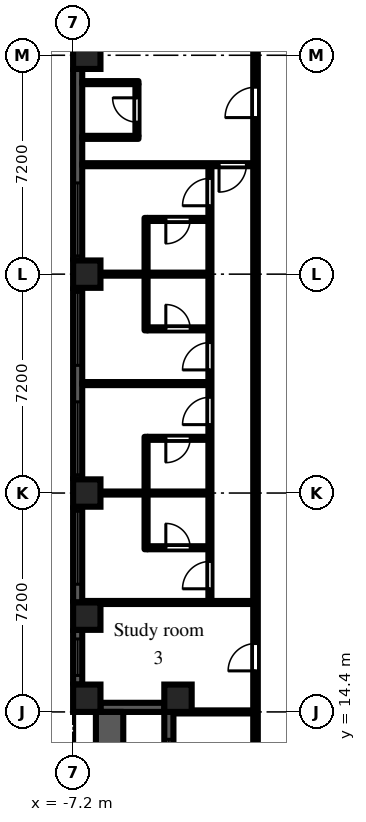
"""IFC4 building model, lengths in metres.
Left out: names, types, materials, properties, quantities, classifications, styles, units other than length and angle.
Written with IfcOpenShell. Run it as: python <this file> out.ifc"""

import sys

from ifc_helpers import new_model, si_unit, direction, frame, frame_2d, origin, origin_2d, place, context, subcontext, project, spatial, rectangle, extrude, element, fill, save


model = new_model("IFC4")
c1 = context("Model", 3, precision=1e-05, world=origin(), true_north=direction((0.0, 1.0)))
c2 = subcontext(c1, "Body", "Model", "MODEL_VIEW")
j1 = project(units=[si_unit("LENGTHUNIT", "METRE"), si_unit("PLANEANGLEUNIT", "RADIAN")], contexts=[c1])
p1 = place(None, origin())
s1 = spatial("IfcSite", under=j1, at=p1, CompositionType="ELEMENT")
p2 = place(p1, origin())
s2 = spatial("IfcBuilding", under=s1, at=p2, CompositionType="ELEMENT")
p3 = place(p2, frame((0.0, 0.0, 29.7)))
s3 = spatial("IfcBuildingStorey", under=s2, at=p3, CompositionType="ELEMENT", Elevation=29.7)
for number, where, z_axis, x_axis in (
    (1, (-6.75, 14.85, 0.0), (0.0, 0.0, 1.0), (1.0, 0.0, 0.0)),
    (2, (-6.75, 17.55, 0.0), (0.0, 0.0, 1.0), (1.0, 0.0, 0.0)),
    (3, (-6.75, 21.6, 0.0), (0.0, 0.0, 1.0), (1.0, 0.0, 0.0)),
    (4, (-6.75, 28.8, 0.0), (0.0, 0.0, 1.0), (1.0, 0.0, 0.0)),
    (5, (-6.75, 36.0, 0.0), (0.0, 0.0, 1.0), (1.0, 0.0, 0.0)),
    (6, (-3.75, 14.85, 0.0), (0.0, 0.0, 1.0), (1.0, 0.0, 0.0)),
):
    element("IfcColumn", number, at=place(p3, frame(where, z_axis=z_axis, x_axis=x_axis)), inside=s3, PredefinedType="COLUMN", context=c2, shape_type="SweptSolid", body=[
        extrude(rectangle(XDim=0.9, YDim=0.9, at=origin_2d()), origin(), (0.0, 0.0, 1.0), 3.0),
    ])
p4 = place(p3, frame((-7.05, 35.55, 0.0), z_axis=(0.0, 0.0, 1.0), x_axis=(0.0, -1.0, 0.0)))
e7 = element("IfcWall", 7, at=p4, inside=s3, PredefinedType="SOLIDWALL", context=c2, shape_type="SweptSolid", body=[
    extrude(rectangle(XDim=6.3, YDim=0.3, at=frame_2d((3.15, 0.0))), origin(), (0.0, 0.0, 1.0), 2.1),
])
p5 = place(p4, frame((3.75, 0.0, 0.2)))
e8 = element("IfcOpeningElement", 8, at=p5, cuts=e7, PredefinedType="OPENING", context=c2, shape_type="SweptSolid", body=[
    extrude(rectangle(XDim=2.4, YDim=1.85, at=frame_2d((1.2, 0.925))), frame((0.0, 0.16, 0.0), z_axis=(0.0, -1.0, 0.0), x_axis=(1.0, 0.0, 0.0)), (0.0, 0.0, 1.0), 0.32),
])
p6 = place(p3, frame((-7.05, 28.35, 0.0), z_axis=(0.0, 0.0, 1.0), x_axis=(0.0, -1.0, 0.0)))
e9 = element("IfcWall", 9, at=p6, inside=s3, PredefinedType="SOLIDWALL", context=c2, shape_type="SweptSolid", body=[
    extrude(rectangle(XDim=6.3, YDim=0.3, at=frame_2d((3.15, 0.0))), origin(), (0.0, 0.0, 1.0), 2.1),
])
p7 = place(p6, frame((0.15, 0.0, 0.2)))
e10 = element("IfcOpeningElement", 10, at=p7, cuts=e9, PredefinedType="OPENING", context=c2, shape_type="SweptSolid", body=[
    extrude(rectangle(XDim=2.4, YDim=1.85, at=frame_2d((1.2, 0.925))), frame((0.0, 0.16, 0.0), z_axis=(0.0, -1.0, 0.0), x_axis=(1.0, 0.0, 0.0)), (0.0, 0.0, 1.0), 0.32),
])
p8 = place(p6, frame((3.75, 0.0, 0.2)))
e11 = element("IfcOpeningElement", 11, at=p8, cuts=e9, PredefinedType="OPENING", context=c2, shape_type="SweptSolid", body=[
    extrude(rectangle(XDim=2.4, YDim=1.85, at=frame_2d((1.2, 0.925))), frame((0.0, 0.16, 0.0), z_axis=(0.0, -1.0, 0.0), x_axis=(1.0, 0.0, 0.0)), (0.0, 0.0, 1.0), 0.32),
])
p9 = place(p3, frame((-7.05, 21.15, 0.0), z_axis=(0.0, 0.0, 1.0), x_axis=(0.0, -1.0, 0.0)))
e12 = element("IfcWall", 12, at=p9, inside=s3, PredefinedType="SOLIDWALL", context=c2, shape_type="SweptSolid", body=[
    extrude(rectangle(XDim=3.15, YDim=0.3, at=frame_2d((1.575, 0.0))), origin(), (0.0, 0.0, 1.0), 2.1),
])
p10 = place(p9, frame((0.15, 0.0, 0.2)))
e13 = element("IfcOpeningElement", 13, at=p10, cuts=e12, PredefinedType="OPENING", context=c2, shape_type="SweptSolid", body=[
    extrude(rectangle(XDim=2.4, YDim=1.85, at=frame_2d((1.2, 0.925))), frame((0.0, 0.16, 0.0), z_axis=(0.0, -1.0, 0.0), x_axis=(1.0, 0.0, 0.0)), (0.0, 0.0, 1.0), 0.32),
])
p11 = place(p3, frame((-7.05, 17.1, 0.0), z_axis=(0.0, 0.0, 1.0), x_axis=(0.0, -1.0, 0.0)))
e14 = element("IfcWall", 14, at=p11, inside=s3, PredefinedType="SOLIDWALL", context=c2, shape_type="SweptSolid", body=[
    extrude(rectangle(XDim=1.8, YDim=0.3, at=frame_2d((0.9, 0.0))), origin(), (0.0, 0.0, 1.0), 2.1),
])
p12 = place(p11, frame((0.3, 0.0, 0.2)))
e15 = element("IfcOpeningElement", 15, at=p12, cuts=e14, PredefinedType="OPENING", context=c2, shape_type="SweptSolid", body=[
    extrude(rectangle(XDim=1.2, YDim=1.85, at=frame_2d((0.6, 0.925))), frame((0.0, 0.16, 0.0), z_axis=(0.0, -1.0, 0.0), x_axis=(1.0, 0.0, 0.0)), (0.0, 0.0, 1.0), 0.32),
])
p13 = place(p3, frame((-6.3, 14.55, 0.0), z_axis=(0.0, 0.0, 1.0), x_axis=(1.0, 0.0, 0.0)))
e16 = element("IfcWall", 16, at=p13, inside=s3, PredefinedType="SOLIDWALL", context=c2, shape_type="SweptSolid", body=[
    extrude(rectangle(XDim=2.1, YDim=0.3, at=frame_2d((1.05, 0.0))), origin(), (0.0, 0.0, 1.0), 2.1),
])
p14 = place(p3, frame((-4.05, 14.4, 0.0), z_axis=(0.0, 0.0, 1.0), x_axis=(0.0, -1.0, 0.0)))
e17 = element("IfcWall", 17, at=p14, inside=s3, PredefinedType="SOLIDWALL", context=c2, shape_type="SweptSolid", body=[
    extrude(rectangle(XDim=7.2, YDim=0.3, at=frame_2d((3.6, 0.0))), origin(), (0.0, 0.0, 1.0), 2.1),
])
p15 = place(p14, frame((3.0, 0.0, 0.0)))
e18 = element("IfcOpeningElement", 18, at=p15, cuts=e17, PredefinedType="OPENING", context=c2, shape_type="SweptSolid", body=[
    extrude(rectangle(XDim=1.2, YDim=2.05, at=frame_2d((0.6, 1.025))), frame((0.0, 0.16, 0.0), z_axis=(0.0, -1.0, 0.0), x_axis=(1.0, 0.0, 0.0)), (0.0, 0.0, 1.0), 0.32),
])
p16 = place(p14, frame((0.9, 0.0, 0.2)))
e19 = element("IfcOpeningElement", 19, at=p16, cuts=e17, PredefinedType="OPENING", context=c2, shape_type="SweptSolid", body=[
    extrude(rectangle(XDim=1.8, YDim=1.85, at=frame_2d((0.9, 0.925))), frame((0.0, 0.16, 0.0), z_axis=(0.0, -1.0, 0.0), x_axis=(1.0, 0.0, 0.0)), (0.0, 0.0, 1.0), 0.32),
])
p17 = place(p14, frame((4.5, 0.0, 0.2)))
e20 = element("IfcOpeningElement", 20, at=p17, cuts=e17, PredefinedType="OPENING", context=c2, shape_type="SweptSolid", body=[
    extrude(rectangle(XDim=1.8, YDim=1.85, at=frame_2d((0.9, 0.925))), frame((0.0, 0.16, 0.0), z_axis=(0.0, -1.0, 0.0), x_axis=(1.0, 0.0, 0.0)), (0.0, 0.0, 1.0), 0.32),
])
p18 = place(p3, frame((-6.0, 7.2, 0.0), z_axis=(0.0, 0.0, 1.0), x_axis=(0.0, 1.0, 0.0)))
e21 = element("IfcWall", 21, at=p18, inside=s3, PredefinedType="PARAPET", context=c2, shape_type="SweptSolid", body=[
    extrude(rectangle(XDim=7.2, YDim=0.9, at=frame_2d((3.6, 0.0))), origin(), (0.0, 0.0, 1.0), 0.8),
])
p19 = place(p3, frame((-6.9, 18.0, 0.0), z_axis=(0.0, 0.0, 1.0), x_axis=(1.0, 0.0, 0.0)))
e22 = element("IfcWall", 22, at=p19, inside=s3, PredefinedType="PARTITIONING", context=c2, shape_type="SweptSolid", body=[
    extrude(rectangle(XDim=5.625, YDim=0.1, at=frame_2d((2.812, 0.0))), origin(), (0.0, 0.0, 1.0), 2.575),
])
for number, where, z_axis, x_axis in (
    (23, (-6.9, 21.6, 0.0), (0.0, 0.0, 1.0), (1.0, 0.0, 0.0)),
    (24, (-6.9, 25.2, 0.0), (0.0, 0.0, 1.0), (1.0, 0.0, 0.0)),
    (25, (-6.9, 28.8, 0.0), (0.0, 0.0, 1.0), (1.0, 0.0, 0.0)),
):
    element("IfcWall", number, at=place(p3, frame(where, z_axis=z_axis, x_axis=x_axis)), inside=s3, PredefinedType="PARTITIONING", context=c2, shape_type="SweptSolid", body=[
        extrude(rectangle(XDim=4.15, YDim=0.1, at=frame_2d((2.075, 0.0))), origin(), (0.0, 0.0, 1.0), 2.575),
    ])
p20 = place(p3, frame((-6.9, 32.4, 0.0), z_axis=(0.0, 0.0, 1.0), x_axis=(1.0, 0.0, 0.0)))
e26 = element("IfcWall", 26, at=p20, inside=s3, PredefinedType="PARTITIONING", context=c2, shape_type="SweptSolid", body=[
    extrude(rectangle(XDim=5.625, YDim=0.1, at=frame_2d((2.812, 0.0))), origin(), (0.0, 0.0, 1.0), 2.575),
])
p21 = place(p20, frame((4.5, 0.0, 0.0)))
e27 = element("IfcOpeningElement", 27, at=p21, cuts=e26, PredefinedType="OPENING", context=c2, shape_type="SweptSolid", body=[
    extrude(rectangle(XDim=0.9, YDim=2.1, at=frame_2d((0.45, 1.05))), frame((0.0, 0.06, 0.0), z_axis=(0.0, -1.0, 0.0), x_axis=(1.0, 0.0, 0.0)), (0.0, 0.0, 1.0), 0.12),
])
for number, where, z_axis, x_axis in (
    (28, (-6.9, 33.3, 0.0), (0.0, 0.0, 1.0), (1.0, 0.0, 0.0)),
    (29, (-6.9, 35.1, 0.0), (0.0, 0.0, 1.0), (1.0, 0.0, 0.0)),
):
    element("IfcWall", number, at=place(p3, frame(where, z_axis=z_axis, x_axis=x_axis)), inside=s3, PredefinedType="PARTITIONING", context=c2, shape_type="SweptSolid", body=[
        extrude(rectangle(XDim=1.85, YDim=0.1, at=frame_2d((0.925, 0.0))), origin(), (0.0, 0.0, 1.0), 2.575),
    ])
p22 = place(p3, frame((-5.1, 33.35, 0.0), z_axis=(0.0, 0.0, 1.0), x_axis=(0.0, 1.0, 0.0)))
e30 = element("IfcWall", 30, at=p22, inside=s3, PredefinedType="PARTITIONING", context=c2, shape_type="SweptSolid", body=[
    extrude(rectangle(XDim=1.7, YDim=0.1, at=frame_2d((0.85, 0.0))), origin(), (0.0, 0.0, 1.0), 2.575),
])
p23 = place(p22, frame((0.45, 0.0, 0.0)))
e31 = element("IfcOpeningElement", 31, at=p23, cuts=e30, PredefinedType="OPENING", context=c2, shape_type="SweptSolid", body=[
    extrude(rectangle(XDim=0.8, YDim=2.1, at=frame_2d((0.4, 1.05))), frame((0.0, 0.06, 0.0), z_axis=(0.0, -1.0, 0.0), x_axis=(1.0, 0.0, 0.0)), (0.0, 0.0, 1.0), 0.12),
])
p24 = place(p3, frame((-4.8, 19.75, 0.0), z_axis=(0.0, 0.0, 1.0), x_axis=(0.0, 1.0, 0.0)))
e32 = element("IfcWall", 32, at=p24, inside=s3, PredefinedType="PARTITIONING", context=c2, shape_type="SweptSolid", body=[
    extrude(rectangle(XDim=3.7, YDim=0.1, at=frame_2d((1.85, 0.0))), origin(), (0.0, 0.0, 1.0), 2.575),
])
p25 = place(p3, frame((-4.75, 19.8, 0.0), z_axis=(0.0, 0.0, 1.0), x_axis=(1.0, 0.0, 0.0)))
e33 = element("IfcWall", 33, at=p25, inside=s3, PredefinedType="PARTITIONING", context=c2, shape_type="SweptSolid", body=[
    extrude(rectangle(XDim=2.0, YDim=0.1, at=frame_2d((1.0, 0.0))), origin(), (0.0, 0.0, 1.0), 2.575),
])
p26 = place(p25, frame((0.6, 0.0, 0.0)))
e34 = element("IfcOpeningElement", 34, at=p26, cuts=e33, PredefinedType="OPENING", context=c2, shape_type="SweptSolid", body=[
    extrude(rectangle(XDim=0.8, YDim=2.1, at=frame_2d((0.4, 1.05))), frame((0.0, 0.06, 0.0), z_axis=(0.0, -1.0, 0.0), x_axis=(1.0, 0.0, 0.0)), (0.0, 0.0, 1.0), 0.12),
])
p27 = place(p3, frame((-4.75, 23.4, 0.0), z_axis=(0.0, 0.0, 1.0), x_axis=(1.0, 0.0, 0.0)))
e35 = element("IfcWall", 35, at=p27, inside=s3, PredefinedType="PARTITIONING", context=c2, shape_type="SweptSolid", body=[
    extrude(rectangle(XDim=2.0, YDim=0.1, at=frame_2d((1.0, 0.0))), origin(), (0.0, 0.0, 1.0), 2.575),
])
p28 = place(p27, frame((0.6, 0.0, 0.0)))
e36 = element("IfcOpeningElement", 36, at=p28, cuts=e35, PredefinedType="OPENING", context=c2, shape_type="SweptSolid", body=[
    extrude(rectangle(XDim=0.8, YDim=2.1, at=frame_2d((0.4, 1.05))), frame((0.0, 0.06, 0.0), z_axis=(0.0, -1.0, 0.0), x_axis=(1.0, 0.0, 0.0)), (0.0, 0.0, 1.0), 0.12),
])
p29 = place(p3, frame((-4.8, 26.95, 0.0), z_axis=(0.0, 0.0, 1.0), x_axis=(0.0, 1.0, 0.0)))
e37 = element("IfcWall", 37, at=p29, inside=s3, PredefinedType="PARTITIONING", context=c2, shape_type="SweptSolid", body=[
    extrude(rectangle(XDim=3.7, YDim=0.1, at=frame_2d((1.85, 0.0))), origin(), (0.0, 0.0, 1.0), 2.575),
])
p30 = place(p3, frame((-4.75, 27.0, 0.0), z_axis=(0.0, 0.0, 1.0), x_axis=(1.0, 0.0, 0.0)))
e38 = element("IfcWall", 38, at=p30, inside=s3, PredefinedType="PARTITIONING", context=c2, shape_type="SweptSolid", body=[
    extrude(rectangle(XDim=2.0, YDim=0.1, at=frame_2d((1.0, 0.0))), origin(), (0.0, 0.0, 1.0), 2.575),
])
p31 = place(p30, frame((0.6, 0.0, 0.0)))
e39 = element("IfcOpeningElement", 39, at=p31, cuts=e38, PredefinedType="OPENING", context=c2, shape_type="SweptSolid", body=[
    extrude(rectangle(XDim=0.8, YDim=2.1, at=frame_2d((0.4, 1.05))), frame((0.0, 0.06, 0.0), z_axis=(0.0, -1.0, 0.0), x_axis=(1.0, 0.0, 0.0)), (0.0, 0.0, 1.0), 0.12),
])
p32 = place(p3, frame((-4.75, 30.6, 0.0), z_axis=(0.0, 0.0, 1.0), x_axis=(1.0, 0.0, 0.0)))
e40 = element("IfcWall", 40, at=p32, inside=s3, PredefinedType="PARTITIONING", context=c2, shape_type="SweptSolid", body=[
    extrude(rectangle(XDim=2.0, YDim=0.1, at=frame_2d((1.0, 0.0))), origin(), (0.0, 0.0, 1.0), 2.575),
])
p33 = place(p32, frame((0.6, 0.0, 0.0)))
e41 = element("IfcOpeningElement", 41, at=p33, cuts=e40, PredefinedType="OPENING", context=c2, shape_type="SweptSolid", body=[
    extrude(rectangle(XDim=0.8, YDim=2.1, at=frame_2d((0.4, 1.05))), frame((0.0, 0.06, 0.0), z_axis=(0.0, -1.0, 0.0), x_axis=(1.0, 0.0, 0.0)), (0.0, 0.0, 1.0), 0.12),
])
p34 = place(p3, frame((-3.9, 14.4, 0.0), z_axis=(0.0, 0.0, 1.0), x_axis=(1.0, 0.0, 0.0)))
e42 = element("IfcWall", 42, at=p34, inside=s3, PredefinedType="PARTITIONING", context=c2, shape_type="SweptSolid", body=[
    extrude(rectangle(XDim=2.625, YDim=0.1, at=frame_2d((1.312, 0.0))), origin(), (0.0, 0.0, 1.0), 2.575),
])
p35 = place(p3, frame((-2.7, 18.05, 0.0), z_axis=(0.0, 0.0, 1.0), x_axis=(0.0, 1.0, 0.0)))
e43 = element("IfcWall", 43, at=p35, inside=s3, PredefinedType="PARTITIONING", context=c2, shape_type="SweptSolid", body=[
    extrude(rectangle(XDim=14.3, YDim=0.1, at=frame_2d((7.15, 0.0))), origin(), (0.0, 0.0, 1.0), 2.575),
])
p36 = place(p35, frame((0.4, 0.0, 0.0)))
e44 = element("IfcOpeningElement", 44, at=p36, cuts=e43, PredefinedType="OPENING", context=c2, shape_type="SweptSolid", body=[
    extrude(rectangle(XDim=0.9, YDim=2.1, at=frame_2d((0.45, 1.05))), frame((0.0, 0.06, 0.0), z_axis=(0.0, -1.0, 0.0), x_axis=(1.0, 0.0, 0.0)), (0.0, 0.0, 1.0), 0.12),
])
p37 = place(p35, frame((5.8, 0.0, 0.0)))
e45 = element("IfcOpeningElement", 45, at=p37, cuts=e43, PredefinedType="OPENING", context=c2, shape_type="SweptSolid", body=[
    extrude(rectangle(XDim=0.9, YDim=2.1, at=frame_2d((0.45, 1.05))), frame((0.0, 0.06, 0.0), z_axis=(0.0, -1.0, 0.0), x_axis=(1.0, 0.0, 0.0)), (0.0, 0.0, 1.0), 0.12),
])
p38 = place(p35, frame((7.6, 0.0, 0.0)))
e46 = element("IfcOpeningElement", 46, at=p38, cuts=e43, PredefinedType="OPENING", context=c2, shape_type="SweptSolid", body=[
    extrude(rectangle(XDim=0.9, YDim=2.1, at=frame_2d((0.45, 1.05))), frame((0.0, 0.06, 0.0), z_axis=(0.0, -1.0, 0.0), x_axis=(1.0, 0.0, 0.0)), (0.0, 0.0, 1.0), 0.12),
])
p39 = place(p35, frame((13.0, 0.0, 0.0)))
e47 = element("IfcOpeningElement", 47, at=p39, cuts=e43, PredefinedType="OPENING", context=c2, shape_type="SweptSolid", body=[
    extrude(rectangle(XDim=0.9, YDim=2.1, at=frame_2d((0.45, 1.05))), frame((0.0, 0.06, 0.0), z_axis=(0.0, -1.0, 0.0), x_axis=(1.0, 0.0, 0.0)), (0.0, 0.0, 1.0), 0.12),
])
p40 = place(p3, frame((-1.2, 1.125, 0.0), z_axis=(0.0, 0.0, 1.0), x_axis=(0.0, 1.0, 0.0)))
e48 = element("IfcWall", 48, at=p40, inside=s3, PredefinedType="PARTITIONING", context=c2, shape_type="SweptSolid", body=[
    extrude(rectangle(XDim=35.375, YDim=0.15, at=frame_2d((17.688, 0.0))), origin(), (0.0, 0.0, 1.0), 2.575),
])
p41 = place(p40, frame((2.625, 0.0, 0.0)))
e49 = element("IfcOpeningElement", 49, at=p41, cuts=e48, PredefinedType="OPENING", context=c2, shape_type="SweptSolid", body=[
    extrude(rectangle(XDim=0.9, YDim=2.1, at=frame_2d((0.45, 1.05))), frame((0.0, 0.085, 0.0), z_axis=(0.0, -1.0, 0.0), x_axis=(1.0, 0.0, 0.0)), (0.0, 0.0, 1.0), 0.17),
])
p42 = place(p40, frame((11.025, 0.0, 0.0)))
e50 = element("IfcOpeningElement", 50, at=p42, cuts=e48, PredefinedType="OPENING", context=c2, shape_type="SweptSolid", body=[
    extrude(rectangle(XDim=0.9, YDim=2.1, at=frame_2d((0.45, 1.05))), frame((0.0, 0.085, 0.0), z_axis=(0.0, -1.0, 0.0), x_axis=(1.0, 0.0, 0.0)), (0.0, 0.0, 1.0), 0.17),
])
p43 = place(p40, frame((14.625, 0.0, 0.0)))
e51 = element("IfcOpeningElement", 51, at=p43, cuts=e48, PredefinedType="OPENING", context=c2, shape_type="SweptSolid", body=[
    extrude(rectangle(XDim=0.9, YDim=2.1, at=frame_2d((0.45, 1.05))), frame((0.0, 0.085, 0.0), z_axis=(0.0, -1.0, 0.0), x_axis=(1.0, 0.0, 0.0)), (0.0, 0.0, 1.0), 0.17),
])
p44 = place(p40, frame((32.825, 0.0, 0.0)))
e52 = element("IfcOpeningElement", 52, at=p44, cuts=e48, PredefinedType="OPENING", context=c2, shape_type="SweptSolid", body=[
    extrude(rectangle(XDim=1.0, YDim=2.1, at=frame_2d((0.5, 1.05))), frame((0.0, 0.085, 0.0), z_axis=(0.0, -1.0, 0.0), x_axis=(1.0, 0.0, 0.0)), (0.0, 0.0, 1.0), 0.17),
])
p45 = place(p5, origin())
e53 = element("IfcWindow", 53, at=p45, inside=s3, PartitioningType="SINGLE_PANEL", PredefinedType="WINDOW", context=c2, shape_type="SweptSolid", body=[
    extrude(rectangle(XDim=2.4, YDim=1.85, at=frame_2d((1.2, 0.925))), frame((0.0, 0.03, 0.0), z_axis=(0.0, -1.0, 0.0), x_axis=(1.0, 0.0, 0.0)), (0.0, 0.0, 1.0), 0.06),
])
fill(e8, e53)
p46 = place(p7, origin())
e54 = element("IfcWindow", 54, at=p46, inside=s3, PartitioningType="SINGLE_PANEL", PredefinedType="WINDOW", context=c2, shape_type="SweptSolid", body=[
    extrude(rectangle(XDim=2.4, YDim=1.85, at=frame_2d((1.2, 0.925))), frame((0.0, 0.03, 0.0), z_axis=(0.0, -1.0, 0.0), x_axis=(1.0, 0.0, 0.0)), (0.0, 0.0, 1.0), 0.06),
])
fill(e10, e54)
p47 = place(p8, origin())
e55 = element("IfcWindow", 55, at=p47, inside=s3, PartitioningType="SINGLE_PANEL", PredefinedType="WINDOW", context=c2, shape_type="SweptSolid", body=[
    extrude(rectangle(XDim=2.4, YDim=1.85, at=frame_2d((1.2, 0.925))), frame((0.0, 0.03, 0.0), z_axis=(0.0, -1.0, 0.0), x_axis=(1.0, 0.0, 0.0)), (0.0, 0.0, 1.0), 0.06),
])
fill(e11, e55)
p48 = place(p10, origin())
e56 = element("IfcWindow", 56, at=p48, inside=s3, PartitioningType="SINGLE_PANEL", PredefinedType="WINDOW", context=c2, shape_type="SweptSolid", body=[
    extrude(rectangle(XDim=2.4, YDim=1.85, at=frame_2d((1.2, 0.925))), frame((0.0, 0.03, 0.0), z_axis=(0.0, -1.0, 0.0), x_axis=(1.0, 0.0, 0.0)), (0.0, 0.0, 1.0), 0.06),
])
fill(e13, e56)
p49 = place(p12, origin())
e57 = element("IfcWindow", 57, at=p49, inside=s3, PartitioningType="SINGLE_PANEL", PredefinedType="WINDOW", context=c2, shape_type="SweptSolid", body=[
    extrude(rectangle(XDim=1.2, YDim=1.85, at=frame_2d((0.6, 0.925))), frame((0.0, 0.03, 0.0), z_axis=(0.0, -1.0, 0.0), x_axis=(1.0, 0.0, 0.0)), (0.0, 0.0, 1.0), 0.06),
])
fill(e15, e57)
p50 = place(p16, origin())
e58 = element("IfcWindow", 58, at=p50, inside=s3, PartitioningType="SINGLE_PANEL", PredefinedType="WINDOW", context=c2, shape_type="SweptSolid", body=[
    extrude(rectangle(XDim=1.8, YDim=1.85, at=frame_2d((0.9, 0.925))), frame((0.0, 0.03, 0.0), z_axis=(0.0, -1.0, 0.0), x_axis=(1.0, 0.0, 0.0)), (0.0, 0.0, 1.0), 0.06),
])
fill(e19, e58)
p51 = place(p43, origin())
e59 = element("IfcDoor", 59, at=p51, inside=s3, OperationType="SINGLE_SWING_LEFT", PredefinedType="DOOR", context=c2, shape_type="SweptSolid", body=[
    extrude(rectangle(XDim=0.9, YDim=2.1, at=frame_2d((0.45, 1.05))), frame((0.0, 0.025, 0.0), z_axis=(0.0, -1.0, 0.0), x_axis=(1.0, 0.0, 0.0)), (0.0, 0.0, 1.0), 0.05),
])
fill(e51, e59)
p52 = place(p23, origin())
e60 = element("IfcDoor", 60, at=p52, inside=s3, OperationType="SINGLE_SWING_RIGHT", PredefinedType="DOOR", context=c2, shape_type="SweptSolid", body=[
    extrude(rectangle(XDim=0.8, YDim=2.1, at=frame_2d((0.4, 1.05))), frame((0.0, 0.025, 0.0), z_axis=(0.0, -1.0, 0.0), x_axis=(1.0, 0.0, 0.0)), (0.0, 0.0, 1.0), 0.05),
])
fill(e31, e60)
p53 = place(p44, origin())
e61 = element("IfcDoor", 61, at=p53, inside=s3, OperationType="SINGLE_SWING_LEFT", PredefinedType="DOOR", context=c2, shape_type="SweptSolid", body=[
    extrude(rectangle(XDim=1.0, YDim=2.1, at=frame_2d((0.5, 1.05))), frame((0.0, 0.025, 0.0), z_axis=(0.0, -1.0, 0.0), x_axis=(1.0, 0.0, 0.0)), (0.0, 0.0, 1.0), 0.05),
])
fill(e52, e61)
p54 = place(p36, origin())
e62 = element("IfcDoor", 62, at=p54, inside=s3, OperationType="SINGLE_SWING_LEFT", PredefinedType="DOOR", context=c2, shape_type="SweptSolid", body=[
    extrude(rectangle(XDim=0.9, YDim=2.1, at=frame_2d((0.45, 1.05))), frame((0.0, 0.025, 0.0), z_axis=(0.0, -1.0, 0.0), x_axis=(1.0, 0.0, 0.0)), (0.0, 0.0, 1.0), 0.05),
])
fill(e44, e62)
p55 = place(p37, origin())
e63 = element("IfcDoor", 63, at=p55, inside=s3, OperationType="SINGLE_SWING_LEFT", PredefinedType="DOOR", context=c2, shape_type="SweptSolid", body=[
    extrude(rectangle(XDim=0.9, YDim=2.1, at=frame_2d((0.45, 1.05))), frame((0.0, 0.025, 0.0), z_axis=(0.0, -1.0, 0.0), x_axis=(1.0, 0.0, 0.0)), (0.0, 0.0, 1.0), 0.05),
])
fill(e45, e63)
p56 = place(p38, origin())
e64 = element("IfcDoor", 64, at=p56, inside=s3, OperationType="SINGLE_SWING_LEFT", PredefinedType="DOOR", context=c2, shape_type="SweptSolid", body=[
    extrude(rectangle(XDim=0.9, YDim=2.1, at=frame_2d((0.45, 1.05))), frame((0.0, 0.025, 0.0), z_axis=(0.0, -1.0, 0.0), x_axis=(1.0, 0.0, 0.0)), (0.0, 0.0, 1.0), 0.05),
])
fill(e46, e64)
p57 = place(p39, origin())
e65 = element("IfcDoor", 65, at=p57, inside=s3, OperationType="SINGLE_SWING_LEFT", PredefinedType="DOOR", context=c2, shape_type="SweptSolid", body=[
    extrude(rectangle(XDim=0.9, YDim=2.1, at=frame_2d((0.45, 1.05))), frame((0.0, 0.025, 0.0), z_axis=(0.0, -1.0, 0.0), x_axis=(1.0, 0.0, 0.0)), (0.0, 0.0, 1.0), 0.05),
])
fill(e47, e65)
p58 = place(p21, frame((0.9, 0.0, 0.0), z_axis=(0.0, 0.0, 1.0), x_axis=(-1.0, 0.0, 0.0)))
e66 = element("IfcDoor", 66, at=p58, inside=s3, OperationType="SINGLE_SWING_RIGHT", PredefinedType="DOOR", context=c2, shape_type="SweptSolid", body=[
    extrude(rectangle(XDim=0.9, YDim=2.1, at=frame_2d((0.45, 1.05))), frame((0.0, 0.025, 0.0), z_axis=(0.0, -1.0, 0.0), x_axis=(1.0, 0.0, 0.0)), (0.0, 0.0, 1.0), 0.05),
])
fill(e27, e66)
p59 = place(p26, origin())
e67 = element("IfcDoor", 67, at=p59, inside=s3, OperationType="SINGLE_SWING_LEFT", PredefinedType="DOOR", context=c2, shape_type="SweptSolid", body=[
    extrude(rectangle(XDim=0.8, YDim=2.1, at=frame_2d((0.4, 1.05))), frame((0.0, 0.025, 0.0), z_axis=(0.0, -1.0, 0.0), x_axis=(1.0, 0.0, 0.0)), (0.0, 0.0, 1.0), 0.05),
])
fill(e34, e67)
p60 = place(p28, frame((0.8, 0.0, 0.0), z_axis=(0.0, 0.0, 1.0), x_axis=(-1.0, 0.0, 0.0)))
e68 = element("IfcDoor", 68, at=p60, inside=s3, OperationType="SINGLE_SWING_RIGHT", PredefinedType="DOOR", context=c2, shape_type="SweptSolid", body=[
    extrude(rectangle(XDim=0.8, YDim=2.1, at=frame_2d((0.4, 1.05))), frame((0.0, 0.025, 0.0), z_axis=(0.0, -1.0, 0.0), x_axis=(1.0, 0.0, 0.0)), (0.0, 0.0, 1.0), 0.05),
])
fill(e36, e68)
p61 = place(p31, origin())
e69 = element("IfcDoor", 69, at=p61, inside=s3, OperationType="SINGLE_SWING_LEFT", PredefinedType="DOOR", context=c2, shape_type="SweptSolid", body=[
    extrude(rectangle(XDim=0.8, YDim=2.1, at=frame_2d((0.4, 1.05))), frame((0.0, 0.025, 0.0), z_axis=(0.0, -1.0, 0.0), x_axis=(1.0, 0.0, 0.0)), (0.0, 0.0, 1.0), 0.05),
])
fill(e39, e69)
p62 = place(p33, frame((0.8, 0.0, 0.0), z_axis=(0.0, 0.0, 1.0), x_axis=(-1.0, 0.0, 0.0)))
e70 = element("IfcDoor", 70, at=p62, inside=s3, OperationType="SINGLE_SWING_RIGHT", PredefinedType="DOOR", context=c2, shape_type="SweptSolid", body=[
    extrude(rectangle(XDim=0.8, YDim=2.1, at=frame_2d((0.4, 1.05))), frame((0.0, 0.025, 0.0), z_axis=(0.0, -1.0, 0.0), x_axis=(1.0, 0.0, 0.0)), (0.0, 0.0, 1.0), 0.05),
])
fill(e41, e70)
save(model, sys.argv[1])
